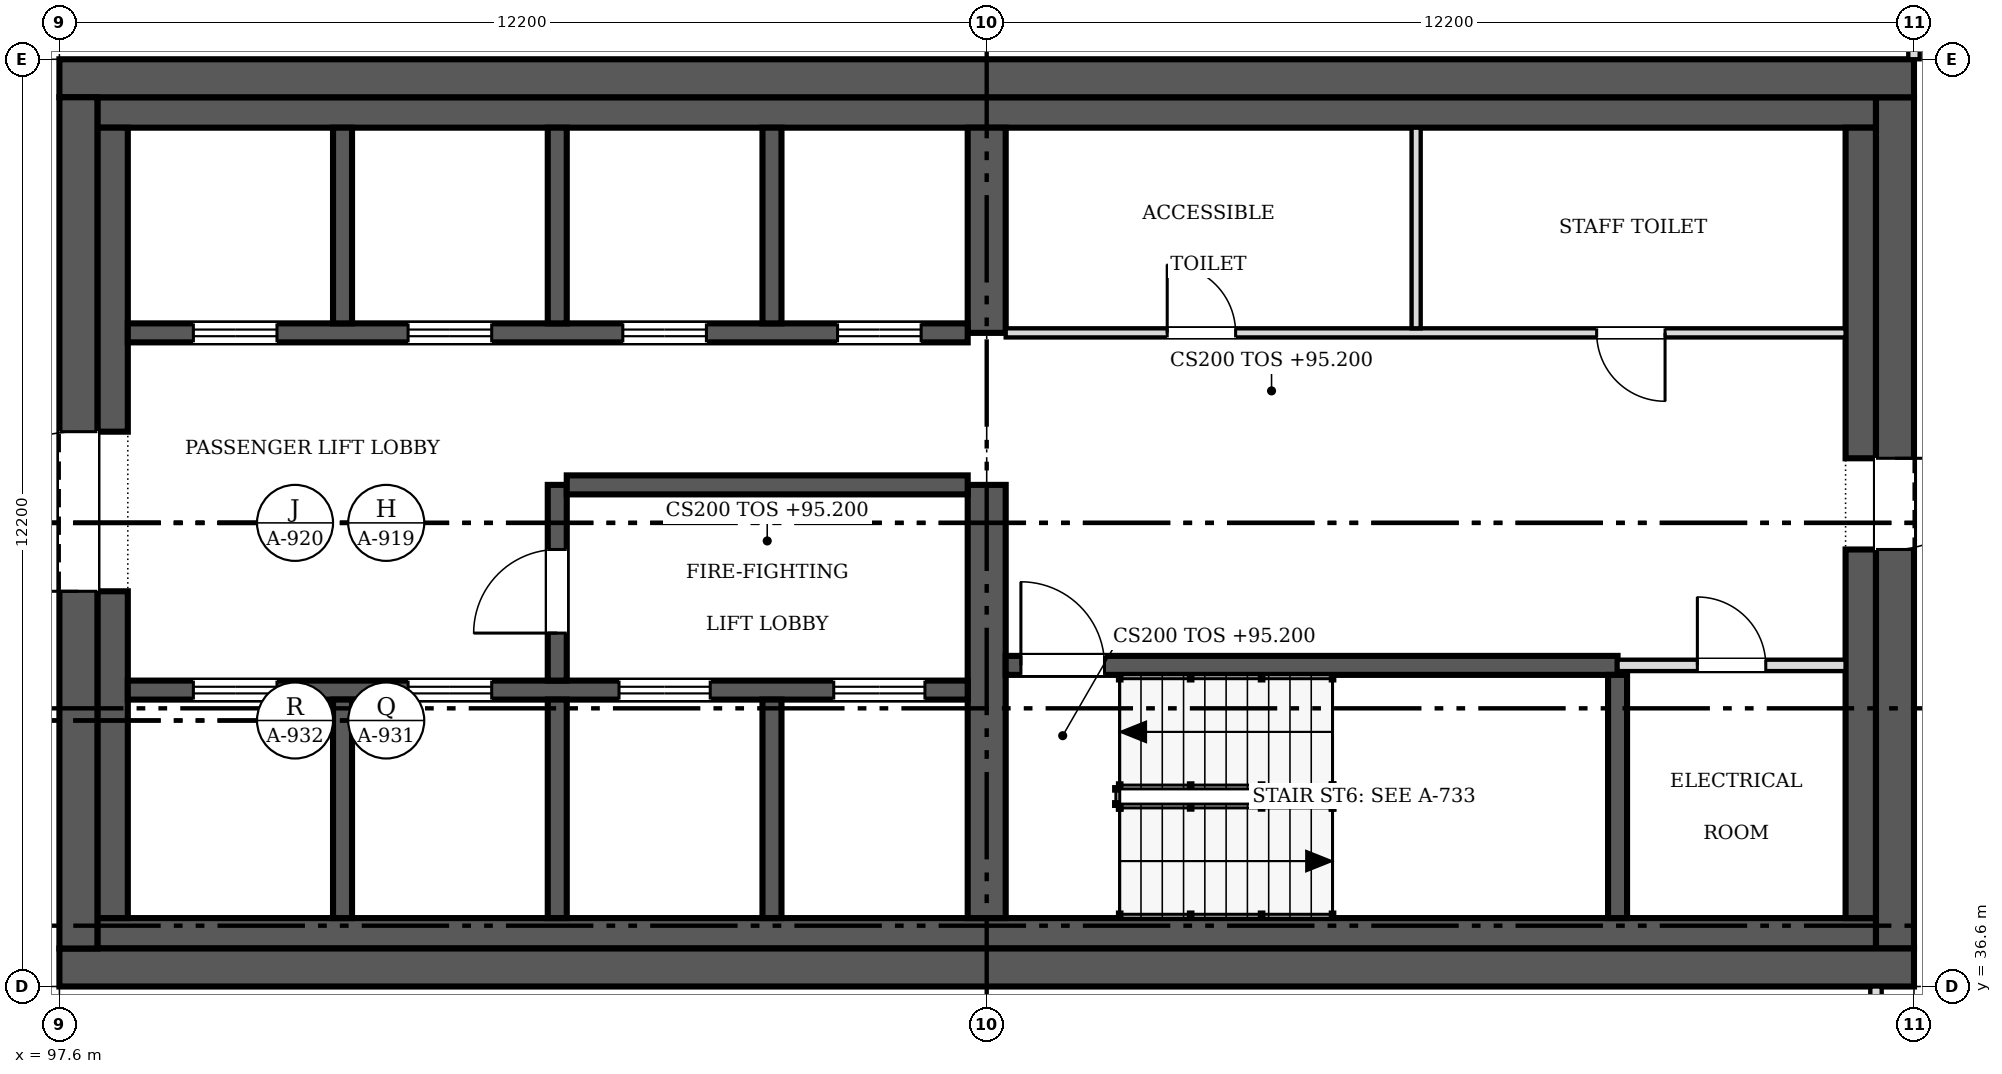
"""IFC4 building model, lengths in metres.
Left out: names, types, materials, properties, quantities, classifications, styles, units other than length and angle.
Written with IfcOpenShell. Run it as: python <this file> out.ifc"""

import sys

from ifc_helpers import new_model, si_unit, direction, frame, frame_2d, origin, place, context, subcontext, project, spatial, rectangle, extrude, source, transform, mapped, element, fill, save


model = new_model("IFC4")
c1 = context("Model", 3, precision=1e-05, world=origin(), true_north=direction((0.0, 1.0)))
c2 = subcontext(c1, "Body", "Model", "MODEL_VIEW")
j1 = project(units=[si_unit("LENGTHUNIT", "METRE"), si_unit("PLANEANGLEUNIT", "RADIAN")], contexts=[c1])
p1 = place(None, origin())
s1 = spatial("IfcSite", under=j1, at=p1, CompositionType="ELEMENT")
p2 = place(p1, origin())
s2 = spatial("IfcBuilding", under=s1, at=p2, CompositionType="ELEMENT")
p3 = place(p2, frame((0.0, 0.0, 95.2)))
s3 = spatial("IfcBuildingStorey", under=s2, at=p3, CompositionType="ELEMENT", Elevation=95.2)
p4 = place(p3, frame((122.0, 36.85, 0.0), z_axis=(0.0, 0.0, 1.0), x_axis=(-1.0, 0.0, 0.0)))
e1 = element("IfcWall", 1, at=p4, inside=s3, PredefinedType="SHEAR", context=c2, shape_type="SweptSolid", body=[
    extrude(rectangle(XDim=24.4, YDim=0.5, at=frame_2d((12.2, 0.0))), origin(), (0.0, 0.0, 1.0), 3.8),
])
p5 = place(p3, frame((97.85, 37.1, 0.0), z_axis=(0.0, 0.0, 1.0), x_axis=(0.0, 1.0, 0.0)))
e2 = element("IfcWall", 2, at=p5, inside=s3, PredefinedType="SHEAR", context=c2, shape_type="SweptSolid", body=[
    extrude(rectangle(XDim=11.2, YDim=0.5, at=frame_2d((5.6, 0.0))), origin(), (0.0, 0.0, 1.0), 3.8),
])
m1 = source(origin(), c2, "Body", "SweptSolid", [
    extrude(rectangle(XDim=2.1, YDim=2.4, at=frame_2d((1.05, 1.2))), frame((0.0, 0.26, 0.0), z_axis=(0.0, -1.0, 0.0), x_axis=(1.0, 0.0, 0.0)), (0.0, 0.0, 1.0), 0.52),
])
p6 = place(p5, frame((4.7, 0.0, 0.0)))
e3 = element("IfcOpeningElement", 3, at=p6, cuts=e2, PredefinedType="OPENING", context=c2, shape_type="MappedRepresentation", body=[
    mapped(m1, transform((0.0, 0.0, 0.0), scale=1.0)),
])
p7 = place(p3, frame((97.6, 48.55, 0.0), z_axis=(0.0, 0.0, 1.0), x_axis=(1.0, 0.0, 0.0)))
e4 = element("IfcWall", 4, at=p7, inside=s3, PredefinedType="SHEAR", context=c2, shape_type="SweptSolid", body=[
    extrude(rectangle(XDim=24.4, YDim=0.5, at=frame_2d((12.2, 0.0))), origin(), (0.0, 0.0, 1.0), 3.8),
])
p8 = place(p3, frame((121.75, 48.3, 0.0), z_axis=(0.0, 0.0, 1.0), x_axis=(0.0, -1.0, 0.0)))
e5 = element("IfcWall", 5, at=p8, inside=s3, PredefinedType="SHEAR", context=c2, shape_type="SweptSolid", body=[
    extrude(rectangle(XDim=11.2, YDim=0.5, at=frame_2d((5.6, 0.0))), origin(), (0.0, 0.0, 1.0), 3.8),
])
m2 = source(origin(), c2, "Body", "SweptSolid", [
    extrude(rectangle(XDim=1.2, YDim=2.1, at=frame_2d((0.6, 1.05))), frame((0.0, 0.26, 0.0), z_axis=(0.0, -1.0, 0.0), x_axis=(1.0, 0.0, 0.0)), (0.0, 0.0, 1.0), 0.52),
])
p9 = place(p8, frame((4.75, 0.0, 0.0)))
e6 = element("IfcOpeningElement", 6, at=p9, cuts=e5, PredefinedType="OPENING", context=c2, shape_type="MappedRepresentation", body=[
    mapped(m2, transform((0.0, 0.0, 0.0), scale=1.0)),
])
for number, where, z_axis, x_axis in (
    (7, (98.1, 37.3, 0.0), (0.0, 0.0, 1.0), (1.0, 0.0, 0.0)),
    (8, (98.1, 48.1, 0.0), (0.0, 0.0, 1.0), (1.0, 0.0, 0.0)),
):
    element("IfcWall", number, at=place(p3, frame(where, z_axis=z_axis, x_axis=x_axis)), inside=s3, PredefinedType="SOLIDWALL", context=c2, shape_type="SweptSolid", body=[
        extrude(rectangle(XDim=23.4, YDim=0.4, at=frame_2d((11.7, 0.0))), origin(), (0.0, 0.0, 1.0), 3.8),
    ])
p10 = place(p3, frame((98.3, 37.5, 0.0), z_axis=(0.0, 0.0, 1.0), x_axis=(0.0, 1.0, 0.0)))
e9 = element("IfcWall", 9, at=p10, inside=s3, PredefinedType="SOLIDWALL", context=c2, shape_type="SweptSolid", body=[
    extrude(rectangle(XDim=4.3, YDim=0.4, at=frame_2d((2.15, 0.0))), origin(), (0.0, 0.0, 1.0), 3.8),
])
p11 = place(p3, frame((98.3, 43.9, 0.0), z_axis=(0.0, 0.0, 1.0), x_axis=(0.0, 1.0, 0.0)))
e10 = element("IfcWall", 10, at=p11, inside=s3, PredefinedType="SOLIDWALL", context=c2, shape_type="SweptSolid", body=[
    extrude(rectangle(XDim=4.0, YDim=0.4, at=frame_2d((2.0, 0.0))), origin(), (0.0, 0.0, 1.0), 3.8),
])
p12 = place(p3, frame((121.3, 37.5, 0.0), z_axis=(0.0, 0.0, 1.0), x_axis=(0.0, 1.0, 0.0)))
e11 = element("IfcWall", 11, at=p12, inside=s3, PredefinedType="SOLIDWALL", context=c2, shape_type="SweptSolid", body=[
    extrude(rectangle(XDim=4.85, YDim=0.4, at=frame_2d((2.425, 0.0))), origin(), (0.0, 0.0, 1.0), 3.8),
])
p13 = place(p3, frame((121.3, 43.55, 0.0), z_axis=(0.0, 0.0, 1.0), x_axis=(0.0, 1.0, 0.0)))
e12 = element("IfcWall", 12, at=p13, inside=s3, PredefinedType="SOLIDWALL", context=c2, shape_type="SweptSolid", body=[
    extrude(rectangle(XDim=4.35, YDim=0.4, at=frame_2d((2.175, 0.0))), origin(), (0.0, 0.0, 1.0), 3.8),
])
p14 = place(p3, frame((109.8, 37.5, 0.0), z_axis=(0.0, 0.0, 1.0), x_axis=(0.0, 1.0, 0.0)))
e13 = element("IfcWall", 13, at=p14, inside=s3, PredefinedType="SHEAR", context=c2, shape_type="SweptSolid", body=[
    extrude(rectangle(XDim=5.7, YDim=0.5, at=frame_2d((2.85, 0.0))), origin(), (0.0, 0.0, 1.0), 3.8),
])
p15 = place(p3, frame((109.8, 45.2, 0.0), z_axis=(0.0, 0.0, 1.0), x_axis=(0.0, 1.0, 0.0)))
e14 = element("IfcWall", 14, at=p15, inside=s3, PredefinedType="SHEAR", context=c2, shape_type="SweptSolid", body=[
    extrude(rectangle(XDim=2.7, YDim=0.5, at=frame_2d((1.35, 0.0))), origin(), (0.0, 0.0, 1.0), 3.8),
])
p16 = place(p3, frame((98.5, 40.5, 0.0), z_axis=(0.0, 0.0, 1.0), x_axis=(1.0, 0.0, 0.0)))
e15 = element("IfcWall", 15, at=p16, inside=s3, PredefinedType="SOLIDWALL", context=c2, shape_type="SweptSolid", body=[
    extrude(rectangle(XDim=11.05, YDim=0.25, at=frame_2d((5.525, 0.0))), origin(), (0.0, 0.0, 1.0), 3.8),
])
m3 = source(origin(), c2, "Body", "SweptSolid", [
    extrude(rectangle(XDim=1.1, YDim=2.1, at=frame_2d((0.55, 1.05))), frame((0.0, 0.135, 0.0), z_axis=(0.0, -1.0, 0.0), x_axis=(1.0, 0.0, 0.0)), (0.0, 0.0, 1.0), 0.27),
])
p17 = place(p16, frame((0.863, 0.0, 0.0)))
e16 = element("IfcOpeningElement", 16, at=p17, cuts=e15, PredefinedType="OPENING", context=c2, shape_type="MappedRepresentation", body=[
    mapped(m3, transform((0.0, 0.0, 0.0), scale=1.0)),
])
p18 = place(p16, frame((3.688, 0.0, 0.0)))
e17 = element("IfcOpeningElement", 17, at=p18, cuts=e15, PredefinedType="OPENING", context=c2, shape_type="MappedRepresentation", body=[
    mapped(m3, transform((0.0, 0.0, 0.0), scale=1.0)),
])
m4 = source(origin(), c2, "Body", "SweptSolid", [
    extrude(rectangle(XDim=1.2, YDim=2.1, at=frame_2d((0.6, 1.05))), frame((0.0, 0.135, 0.0), z_axis=(0.0, -1.0, 0.0), x_axis=(1.0, 0.0, 0.0)), (0.0, 0.0, 1.0), 0.27),
])
p19 = place(p16, frame((6.462, 0.0, 0.0)))
e18 = element("IfcOpeningElement", 18, at=p19, cuts=e15, PredefinedType="OPENING", context=c2, shape_type="MappedRepresentation", body=[
    mapped(m4, transform((0.0, 0.0, 0.0), scale=1.0)),
])
p20 = place(p16, frame((9.288, 0.0, 0.0)))
e19 = element("IfcOpeningElement", 19, at=p20, cuts=e15, PredefinedType="OPENING", context=c2, shape_type="MappedRepresentation", body=[
    mapped(m4, transform((0.0, 0.0, 0.0), scale=1.0)),
])
p21 = place(p3, frame((109.55, 45.2, 0.0), z_axis=(0.0, 0.0, 1.0), x_axis=(-1.0, 0.0, 0.0)))
e20 = element("IfcWall", 20, at=p21, inside=s3, PredefinedType="SOLIDWALL", context=c2, shape_type="SweptSolid", body=[
    extrude(rectangle(XDim=11.05, YDim=0.25, at=frame_2d((5.525, 0.0))), origin(), (0.0, 0.0, 1.0), 3.8),
])
p22 = place(p21, frame((9.087, 0.0, 0.0)))
e21 = element("IfcOpeningElement", 21, at=p22, cuts=e20, PredefinedType="OPENING", context=c2, shape_type="MappedRepresentation", body=[
    mapped(m3, transform((0.0, 0.0, 0.0), scale=1.0)),
])
p23 = place(p21, frame((6.262, 0.0, 0.0)))
e22 = element("IfcOpeningElement", 22, at=p23, cuts=e20, PredefinedType="OPENING", context=c2, shape_type="MappedRepresentation", body=[
    mapped(m3, transform((0.0, 0.0, 0.0), scale=1.0)),
])
p24 = place(p21, frame((3.438, 0.0, 0.0)))
e23 = element("IfcOpeningElement", 23, at=p24, cuts=e20, PredefinedType="OPENING", context=c2, shape_type="MappedRepresentation", body=[
    mapped(m3, transform((0.0, 0.0, 0.0), scale=1.0)),
])
p25 = place(p21, frame((0.613, 0.0, 0.0)))
e24 = element("IfcOpeningElement", 24, at=p25, cuts=e20, PredefinedType="OPENING", context=c2, shape_type="MappedRepresentation", body=[
    mapped(m3, transform((0.0, 0.0, 0.0), scale=1.0)),
])
p26 = place(p3, frame((118.1, 40.825, 0.0), z_axis=(0.0, 0.0, 1.0), x_axis=(-1.0, 0.0, 0.0)))
e25 = element("IfcWall", 25, at=p26, inside=s3, PredefinedType="SOLIDWALL", context=c2, shape_type="SweptSolid", body=[
    extrude(rectangle(XDim=8.05, YDim=0.25, at=frame_2d((4.025, 0.0))), origin(), (0.0, 0.0, 1.0), 3.8),
])
p27 = place(p26, frame((6.75, 0.0, 0.0)))
e26 = element("IfcOpeningElement", 26, at=p27, cuts=e25, PredefinedType="OPENING", context=c2, shape_type="MappedRepresentation", body=[
    mapped(m3, transform((0.0, 0.0, 0.0), scale=1.0)),
])
p28 = place(p3, frame((104.15, 37.5, 0.0), z_axis=(0.0, 0.0, 1.0), x_axis=(0.0, 1.0, 0.0)))
e27 = element("IfcWall", 27, at=p28, inside=s3, PredefinedType="SOLIDWALL", context=c2, shape_type="SweptSolid", body=[
    extrude(rectangle(XDim=2.875, YDim=0.25, at=frame_2d((1.438, 0.0))), origin(), (0.0, 0.0, 1.0), 3.8),
])
p29 = place(p3, frame((104.15, 43.2, 0.0), z_axis=(0.0, 0.0, 1.0), x_axis=(0.0, -1.0, 0.0)))
e28 = element("IfcWall", 28, at=p29, inside=s3, PredefinedType="SOLIDWALL", context=c2, shape_type="SweptSolid", body=[
    extrude(rectangle(XDim=2.575, YDim=0.25, at=frame_2d((1.288, 0.0))), origin(), (0.0, 0.0, 1.0), 3.8),
])
p30 = place(p29, frame((0.85, 0.0, 0.0)))
e29 = element("IfcOpeningElement", 29, at=p30, cuts=e28, PredefinedType="OPENING", context=c2, shape_type="MappedRepresentation", body=[
    mapped(m3, transform((0.0, 0.0, 0.0), scale=1.0)),
])
p31 = place(p3, frame((104.275, 43.2, 0.0), z_axis=(0.0, 0.0, 1.0), x_axis=(1.0, 0.0, 0.0)))
e30 = element("IfcWall", 30, at=p31, inside=s3, PredefinedType="SOLIDWALL", context=c2, shape_type="SweptSolid", body=[
    extrude(rectangle(XDim=5.275, YDim=0.25, at=frame_2d((2.638, 0.0))), origin(), (0.0, 0.0, 1.0), 3.8),
])
p32 = place(p3, frame((118.1, 37.5, 0.0), z_axis=(0.0, 0.0, 1.0), x_axis=(0.0, 1.0, 0.0)))
e31 = element("IfcWall", 31, at=p32, inside=s3, PredefinedType="SOLIDWALL", context=c2, shape_type="SweptSolid", body=[
    extrude(rectangle(XDim=3.2, YDim=0.25, at=frame_2d((1.6, 0.0))), origin(), (0.0, 0.0, 1.0), 3.8),
])
for number, where, z_axis, x_axis in (
    (32, (101.325, 37.5, 0.0), (0.0, 0.0, 1.0), (0.0, 1.0, 0.0)),
    (33, (106.975, 37.5, 0.0), (0.0, 0.0, 1.0), (0.0, 1.0, 0.0)),
):
    element("IfcWall", number, at=place(p3, frame(where, z_axis=z_axis, x_axis=x_axis)), inside=s3, PredefinedType="SOLIDWALL", context=c2, shape_type="SweptSolid", body=[
        extrude(rectangle(XDim=2.875, YDim=0.25, at=frame_2d((1.438, 0.0))), origin(), (0.0, 0.0, 1.0), 3.8),
    ])
for number, where, z_axis, x_axis in (
    (34, (101.325, 45.325, 0.0), (0.0, 0.0, 1.0), (0.0, 1.0, 0.0)),
    (35, (104.15, 45.325, 0.0), (0.0, 0.0, 1.0), (0.0, 1.0, 0.0)),
    (36, (106.975, 45.325, 0.0), (0.0, 0.0, 1.0), (0.0, 1.0, 0.0)),
):
    element("IfcWall", number, at=place(p3, frame(where, z_axis=z_axis, x_axis=x_axis)), inside=s3, PredefinedType="SOLIDWALL", context=c2, shape_type="SweptSolid", body=[
        extrude(rectangle(XDim=2.575, YDim=0.25, at=frame_2d((1.288, 0.0))), origin(), (0.0, 0.0, 1.0), 3.8),
    ])
p33 = place(p3, frame((110.05, 45.2, 0.0), z_axis=(0.0, 0.0, 1.0), x_axis=(1.0, 0.0, 0.0)))
e37 = element("IfcWall", 37, at=p33, inside=s3, PredefinedType="PARTITIONING", context=c2, shape_type="SweptSolid", body=[
    extrude(rectangle(XDim=11.05, YDim=0.12, at=frame_2d((5.525, 0.0))), origin(), (0.0, 0.0, 1.0), 3.6),
])
m5 = source(origin(), c2, "Body", "SweptSolid", [
    extrude(rectangle(XDim=0.9, YDim=2.1, at=frame_2d((0.45, 1.05))), frame((0.0, 0.07, 0.0), z_axis=(0.0, -1.0, 0.0), x_axis=(1.0, 0.0, 0.0)), (0.0, 0.0, 1.0), 0.14),
])
p34 = place(p33, frame((2.125, 0.0, 0.0)))
e38 = element("IfcOpeningElement", 38, at=p34, cuts=e37, PredefinedType="OPENING", context=c2, shape_type="MappedRepresentation", body=[
    mapped(m5, transform((0.0, 0.0, 0.0), scale=1.0)),
])
p35 = place(p33, frame((7.775, 0.0, 0.0)))
e39 = element("IfcOpeningElement", 39, at=p35, cuts=e37, PredefinedType="OPENING", context=c2, shape_type="MappedRepresentation", body=[
    mapped(m5, transform((0.0, 0.0, 0.0), scale=1.0)),
])
p36 = place(p3, frame((121.1, 40.825, 0.0), z_axis=(0.0, 0.0, 1.0), x_axis=(-1.0, 0.0, 0.0)))
e40 = element("IfcWall", 40, at=p36, inside=s3, PredefinedType="PARTITIONING", context=c2, shape_type="SweptSolid", body=[
    extrude(rectangle(XDim=3.0, YDim=0.15, at=frame_2d((1.5, 0.0))), origin(), (0.0, 0.0, 1.0), 3.6),
])
m6 = source(origin(), c2, "Body", "SweptSolid", [
    extrude(rectangle(XDim=0.9, YDim=2.1, at=frame_2d((0.45, 1.05))), frame((0.0, 0.085, 0.0), z_axis=(0.0, -1.0, 0.0), x_axis=(1.0, 0.0, 0.0)), (0.0, 0.0, 1.0), 0.17),
])
p37 = place(p36, frame((1.05, 0.0, 0.0)))
e41 = element("IfcOpeningElement", 41, at=p37, cuts=e40, PredefinedType="OPENING", context=c2, shape_type="MappedRepresentation", body=[
    mapped(m6, transform((0.0, 0.0, 0.0), scale=1.0)),
])
p38 = place(p3, frame((115.45, 45.26, 0.0), z_axis=(0.0, 0.0, 1.0), x_axis=(0.0, 1.0, 0.0)))
e42 = element("IfcWall", 42, at=p38, inside=s3, PredefinedType="PARTITIONING", context=c2, shape_type="SweptSolid", body=[
    extrude(rectangle(XDim=2.64, YDim=0.12, at=frame_2d((1.32, 0.0))), origin(), (0.0, 0.0, 1.0), 3.6),
])
p39 = place(p3, frame((121.5, 36.6, 0.0), z_axis=(0.0, 0.0, 1.0), x_axis=(0.0, -1.0, 0.0)))
e43 = element("IfcWall", 43, at=p39, inside=s3, PredefinedType="PARTITIONING", context=c2, shape_type="SweptSolid", body=[
    extrude(rectangle(XDim=2.524, YDim=0.15, at=frame_2d((1.262, 0.0))), origin(), (0.0, 0.0, 1.0), 3.067),
])
m7 = source(origin(), c2, "Body", "SweptSolid", [
    extrude(rectangle(XDim=1.0, YDim=2.1, at=frame_2d((0.5, 1.05))), frame((0.0, 0.085, 0.0), z_axis=(0.0, -1.0, 0.0), x_axis=(1.0, 0.0, 0.0)), (0.0, 0.0, 1.0), 0.17),
])
p40 = place(p39, frame((0.724, 0.0, 0.0)))
e44 = element("IfcOpeningElement", 44, at=p40, cuts=e43, PredefinedType="OPENING", context=c2, shape_type="MappedRepresentation", body=[
    mapped(m7, transform((0.0, 0.0, 0.0), scale=1.0)),
])
p41 = place(p3, frame((122.0, 48.8, 0.0), z_axis=(0.0, 0.0, 1.0), x_axis=(0.0, 1.0, 0.0)))
e45 = element("IfcWall", 45, at=p41, inside=s3, PredefinedType="PARTITIONING", context=c2, shape_type="SweptSolid", body=[
    extrude(rectangle(XDim=2.324, YDim=0.15, at=frame_2d((1.162, 0.0))), origin(), (0.0, 0.0, 1.0), 3.067),
])
m8 = source(origin(), c2, "Body", "SweptSolid", [
    extrude(rectangle(XDim=2.1, YDim=2.4, at=frame_2d((1.05, 1.2))), frame((0.0, 0.025, 0.0), z_axis=(0.0, -1.0, 0.0), x_axis=(1.0, 0.0, 0.0)), (0.0, 0.0, 1.0), 0.05),
])
p42 = place(p6, origin())
e46 = element("IfcDoor", 46, at=p42, inside=s3, OperationType="DOUBLE_DOOR_SINGLE_SWING", PredefinedType="DOOR", context=c2, shape_type="MappedRepresentation", body=[
    mapped(m8, transform((0.0, 0.0, 0.0), scale=1.0)),
])
fill(e3, e46)
m9 = source(origin(), c2, "Body", "SweptSolid", [
    extrude(rectangle(XDim=1.2, YDim=2.1, at=frame_2d((0.6, 1.05))), frame((0.0, 0.025, 0.0), z_axis=(0.0, -1.0, 0.0), x_axis=(1.0, 0.0, 0.0)), (0.0, 0.0, 1.0), 0.05),
])
p43 = place(p9, origin())
e47 = element("IfcDoor", 47, at=p43, inside=s3, OperationType="SINGLE_SWING_LEFT", PredefinedType="DOOR", context=c2, shape_type="MappedRepresentation", body=[
    mapped(m9, transform((0.0, 0.0, 0.0), scale=1.0)),
])
fill(e6, e47)
m10 = source(origin(), c2, "Body", "SweptSolid", [
    extrude(rectangle(XDim=1.1, YDim=2.1, at=frame_2d((0.55, 1.05))), frame((0.0, 0.025, 0.0), z_axis=(0.0, -1.0, 0.0), x_axis=(1.0, 0.0, 0.0)), (0.0, 0.0, 1.0), 0.05),
])
p44 = place(p17, origin())
e48 = element("IfcDoor", 48, at=p44, inside=s3, OperationType="DOUBLE_DOOR_SLIDING", PredefinedType="DOOR", context=c2, shape_type="MappedRepresentation", body=[
    mapped(m10, transform((0.0, 0.0, 0.0), scale=1.0)),
])
fill(e16, e48)
p45 = place(p18, origin())
e49 = element("IfcDoor", 49, at=p45, inside=s3, OperationType="DOUBLE_DOOR_SLIDING", PredefinedType="DOOR", context=c2, shape_type="MappedRepresentation", body=[
    mapped(m10, transform((0.0, 0.0, 0.0), scale=1.0)),
])
fill(e17, e49)
p46 = place(p19, origin())
e50 = element("IfcDoor", 50, at=p46, inside=s3, OperationType="DOUBLE_DOOR_SLIDING", PredefinedType="DOOR", context=c2, shape_type="MappedRepresentation", body=[
    mapped(m9, transform((0.0, 0.0, 0.0), scale=1.0)),
])
fill(e18, e50)
p47 = place(p20, origin())
e51 = element("IfcDoor", 51, at=p47, inside=s3, OperationType="DOUBLE_DOOR_SLIDING", PredefinedType="DOOR", context=c2, shape_type="MappedRepresentation", body=[
    mapped(m9, transform((0.0, 0.0, 0.0), scale=1.0)),
])
fill(e19, e51)
p48 = place(p22, origin())
e52 = element("IfcDoor", 52, at=p48, inside=s3, OperationType="DOUBLE_DOOR_SLIDING", PredefinedType="DOOR", context=c2, shape_type="MappedRepresentation", body=[
    mapped(m10, transform((0.0, 0.0, 0.0), scale=1.0)),
])
fill(e21, e52)
p49 = place(p23, origin())
e53 = element("IfcDoor", 53, at=p49, inside=s3, OperationType="DOUBLE_DOOR_SLIDING", PredefinedType="DOOR", context=c2, shape_type="MappedRepresentation", body=[
    mapped(m10, transform((0.0, 0.0, 0.0), scale=1.0)),
])
fill(e22, e53)
p50 = place(p24, origin())
e54 = element("IfcDoor", 54, at=p50, inside=s3, OperationType="DOUBLE_DOOR_SLIDING", PredefinedType="DOOR", context=c2, shape_type="MappedRepresentation", body=[
    mapped(m10, transform((0.0, 0.0, 0.0), scale=1.0)),
])
fill(e23, e54)
p51 = place(p25, origin())
e55 = element("IfcDoor", 55, at=p51, inside=s3, OperationType="DOUBLE_DOOR_SLIDING", PredefinedType="DOOR", context=c2, shape_type="MappedRepresentation", body=[
    mapped(m10, transform((0.0, 0.0, 0.0), scale=1.0)),
])
fill(e24, e55)
p52 = place(p27, origin())
e56 = element("IfcDoor", 56, at=p52, inside=s3, OperationType="SINGLE_SWING_RIGHT", PredefinedType="DOOR", context=c2, shape_type="MappedRepresentation", body=[
    mapped(m10, transform((0.0, 0.0, 0.0), scale=1.0)),
])
fill(e26, e56)
p53 = place(p30, origin())
e57 = element("IfcDoor", 57, at=p53, inside=s3, OperationType="SINGLE_SWING_RIGHT", PredefinedType="DOOR", context=c2, shape_type="MappedRepresentation", body=[
    mapped(m10, transform((0.0, 0.0, 0.0), scale=1.0)),
])
fill(e29, e57)
m11 = source(origin(), c2, "Body", "SweptSolid", [
    extrude(rectangle(XDim=0.9, YDim=2.1, at=frame_2d((0.45, 1.05))), frame((0.0, 0.025, 0.0), z_axis=(0.0, -1.0, 0.0), x_axis=(1.0, 0.0, 0.0)), (0.0, 0.0, 1.0), 0.05),
])
p54 = place(p34, origin())
e58 = element("IfcDoor", 58, at=p54, inside=s3, OperationType="SINGLE_SWING_LEFT", PredefinedType="DOOR", context=c2, shape_type="MappedRepresentation", body=[
    mapped(m11, transform((0.0, 0.0, 0.0), scale=1.0)),
])
fill(e38, e58)
p55 = place(p35, origin())
e59 = element("IfcDoor", 59, at=p55, inside=s3, OperationType="SINGLE_SWING_RIGHT", PredefinedType="DOOR", context=c2, shape_type="MappedRepresentation", body=[
    mapped(m11, transform((0.0, 0.0, 0.0), scale=1.0)),
])
fill(e39, e59)
p56 = place(p37, origin())
e60 = element("IfcDoor", 60, at=p56, inside=s3, OperationType="SINGLE_SWING_RIGHT", PredefinedType="DOOR", context=c2, shape_type="MappedRepresentation", body=[
    mapped(m11, transform((0.0, 0.0, 0.0), scale=1.0)),
])
fill(e41, e60)
save(model, sys.argv[1])
